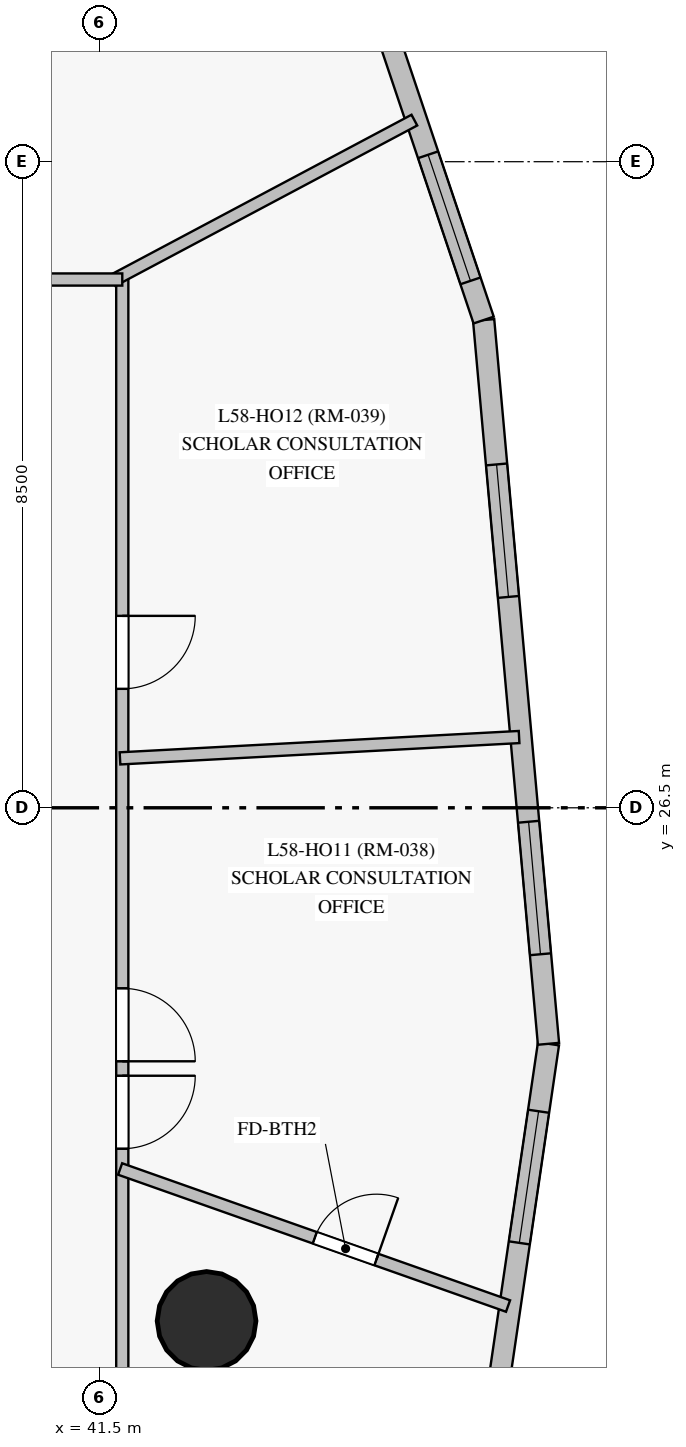
"""IFC4 building model, lengths in metres.
Left out: names, types, materials, properties, quantities, classifications, styles, units other than length and angle.
Written with IfcOpenShell. Run it as: python <this file> out.ifc"""

import sys

from ifc_helpers import new_model, si_unit, direction, frame, frame_2d, origin, origin_with_axes, origin_2d, place, context, subcontext, project, spatial, rectangle, circle, extrude, source, transform, mapped, element, fill, save


model = new_model("IFC4")
c1 = context("Model", 3, precision=1e-05, world=origin(), true_north=direction((0.0, 1.0)))
c2 = subcontext(c1, "Body", "Model", "MODEL_VIEW")
j1 = project(units=[si_unit("LENGTHUNIT", "METRE"), si_unit("PLANEANGLEUNIT", "RADIAN")], contexts=[c1])
p1 = place(None, origin())
s1 = spatial("IfcSite", under=j1, at=p1, CompositionType="ELEMENT")
p2 = place(p1, origin())
s2 = spatial("IfcBuilding", under=s1, at=p2, CompositionType="ELEMENT")
p3 = place(p2, frame((0.0, 0.0, 199.25)))
s3 = spatial("IfcBuildingStorey", under=s2, at=p3, CompositionType="ELEMENT", Elevation=199.25)
m1 = source(origin_with_axes(), c2, "Body", "SweptSolid", [
    extrude(circle(Radius=0.65, at=origin_2d()), origin(), (0.0, 0.0, 1.0), 3.05),
])
p4 = place(p3, frame((42.909, 19.749, 0.0), z_axis=(0.0, 0.0, 1.0), x_axis=(1.0, 0.0, 0.0)))
e1 = element("IfcColumn", 1, at=p4, inside=s3, PredefinedType="COLUMN", context=c2, shape_type="MappedRepresentation", body=[
    mapped(m1, transform((0.0, 0.0, 0.0), scale=1.0)),
])
p5 = place(p3, frame((45.401, 9.705, 0.0), z_axis=(0.0, 0.0, 1.0), x_axis=(0.145019531455, 0.989428792535, 0.0)))
e2 = element("IfcWall", 2, at=p5, inside=s3, PredefinedType="SOLIDWALL", context=c2, shape_type="SweptSolid", body=[
    extrude(rectangle(XDim=13.837, YDim=0.28, at=frame_2d((6.918, 0.0))), origin(), (0.0, 0.0, 1.0), 2.825),
])
p6 = place(p5, frame((2.22, 0.0, 0.85)))
e3 = element("IfcOpeningElement", 3, at=p6, cuts=e2, PredefinedType="OPENING", context=c2, shape_type="SweptSolid", body=[
    extrude(rectangle(XDim=1.75, YDim=1.65, at=frame_2d((0.875, 0.825))), frame((0.0, 0.15, 0.0), z_axis=(0.0, -1.0, 0.0), x_axis=(1.0, 0.0, 0.0)), (0.0, 0.0, 1.0), 0.3),
])
p7 = place(p5, frame((7.366, 0.0, 0.85)))
e4 = element("IfcOpeningElement", 4, at=p7, cuts=e2, PredefinedType="OPENING", context=c2, shape_type="SweptSolid", body=[
    extrude(rectangle(XDim=1.75, YDim=1.65, at=frame_2d((0.875, 0.825))), frame((0.0, 0.15, 0.0), z_axis=(0.0, -1.0, 0.0), x_axis=(1.0, 0.0, 0.0)), (0.0, 0.0, 1.0), 0.3),
])
p8 = place(p5, frame((11.19, 0.0, 0.85)))
e5 = element("IfcOpeningElement", 5, at=p8, cuts=e2, PredefinedType="OPENING", context=c2, shape_type="SweptSolid", body=[
    extrude(rectangle(XDim=1.75, YDim=1.65, at=frame_2d((0.875, 0.825))), frame((0.0, 0.15, 0.0), z_axis=(0.0, -1.0, 0.0), x_axis=(1.0, 0.0, 0.0)), (0.0, 0.0, 1.0), 0.3),
])
p9 = place(p3, frame((47.407, 23.395, 0.0), z_axis=(0.0, 0.0, 1.0), x_axis=(-0.089232355469, 0.996010836657, 0.0)))
e6 = element("IfcWall", 6, at=p9, inside=s3, PredefinedType="SOLIDWALL", context=c2, shape_type="SweptSolid", body=[
    extrude(rectangle(XDim=9.56, YDim=0.28, at=frame_2d((4.78, 0.0))), origin(), (0.0, 0.0, 1.0), 2.825),
])
p10 = place(p9, frame((1.183, 0.0, 0.85)))
e7 = element("IfcOpeningElement", 7, at=p10, cuts=e6, PredefinedType="OPENING", context=c2, shape_type="SweptSolid", body=[
    extrude(rectangle(XDim=1.75, YDim=1.65, at=frame_2d((0.875, 0.825))), frame((0.0, 0.15, 0.0), z_axis=(0.0, -1.0, 0.0), x_axis=(1.0, 0.0, 0.0)), (0.0, 0.0, 1.0), 0.3),
])
p11 = place(p9, frame((5.903, 0.0, 0.85)))
e8 = element("IfcOpeningElement", 8, at=p11, cuts=e6, PredefinedType="OPENING", context=c2, shape_type="SweptSolid", body=[
    extrude(rectangle(XDim=1.75, YDim=1.65, at=frame_2d((0.875, 0.825))), frame((0.0, 0.15, 0.0), z_axis=(0.0, -1.0, 0.0), x_axis=(1.0, 0.0, 0.0)), (0.0, 0.0, 1.0), 0.3),
])
p12 = place(p3, frame((46.554, 32.917, 0.0), z_axis=(0.0, 0.0, 1.0), x_axis=(-0.318603463381, 0.947888091033, 0.0)))
e9 = element("IfcWall", 9, at=p12, inside=s3, PredefinedType="SOLIDWALL", context=c2, shape_type="SweptSolid", body=[
    extrude(rectangle(XDim=13.837, YDim=0.28, at=frame_2d((6.918, 0.0))), origin(), (0.0, 0.0, 1.0), 2.825),
])
p13 = place(p12, frame((0.544, 0.0, 0.85)))
e10 = element("IfcOpeningElement", 10, at=p13, cuts=e9, PredefinedType="OPENING", context=c2, shape_type="SweptSolid", body=[
    extrude(rectangle(XDim=1.75, YDim=1.65, at=frame_2d((0.875, 0.825))), frame((0.0, 0.15, 0.0), z_axis=(0.0, -1.0, 0.0), x_axis=(1.0, 0.0, 0.0)), (0.0, 0.0, 1.0), 0.3),
])
p14 = place(p12, frame((3.949, 0.0, 0.85)))
e11 = element("IfcOpeningElement", 11, at=p14, cuts=e9, PredefinedType="OPENING", context=c2, shape_type="SweptSolid", body=[
    extrude(rectangle(XDim=1.75, YDim=1.65, at=frame_2d((0.875, 0.825))), frame((0.0, 0.15, 0.0), z_axis=(0.0, -1.0, 0.0), x_axis=(1.0, 0.0, 0.0)), (0.0, 0.0, 1.0), 0.3),
])
p15 = place(p12, frame((7.402, 0.0, 0.85)))
e12 = element("IfcOpeningElement", 12, at=p15, cuts=e9, PredefinedType="OPENING", context=c2, shape_type="SweptSolid", body=[
    extrude(rectangle(XDim=1.75, YDim=1.65, at=frame_2d((0.875, 0.825))), frame((0.0, 0.15, 0.0), z_axis=(0.0, -1.0, 0.0), x_axis=(1.0, 0.0, 0.0)), (0.0, 0.0, 1.0), 0.3),
])
p16 = place(p12, frame((10.855, 0.0, 0.85)))
e13 = element("IfcOpeningElement", 13, at=p16, cuts=e9, PredefinedType="OPENING", context=c2, shape_type="SweptSolid", body=[
    extrude(rectangle(XDim=1.75, YDim=1.65, at=frame_2d((0.875, 0.825))), frame((0.0, 0.15, 0.0), z_axis=(0.0, -1.0, 0.0), x_axis=(1.0, 0.0, 0.0)), (0.0, 0.0, 1.0), 0.3),
])
p17 = place(p3, frame((41.8, 33.45, 0.0), z_axis=(0.0, 0.0, 1.0), x_axis=(0.0, -1.0, 0.0)))
e14 = element("IfcWall", 14, at=p17, inside=s3, PredefinedType="PARTITIONING", context=c2, shape_type="SweptSolid", body=[
    extrude(rectangle(XDim=19.6, YDim=0.16, at=frame_2d((9.8, 0.0))), origin(), (0.0, 0.0, 1.0), 2.275),
])
p18 = place(p17, frame((10.475, 0.0, 0.0)))
e15 = element("IfcOpeningElement", 15, at=p18, cuts=e14, PredefinedType="OPENING", context=c2, shape_type="SweptSolid", body=[
    extrude(rectangle(XDim=0.96, YDim=2.15, at=frame_2d((0.48, 1.075))), frame((0.0, 0.09, 0.0), z_axis=(0.0, -1.0, 0.0), x_axis=(1.0, 0.0, 0.0)), (0.0, 0.0, 1.0), 0.18),
])
p19 = place(p17, frame((9.325, 0.0, 0.0)))
e16 = element("IfcOpeningElement", 16, at=p19, cuts=e14, PredefinedType="OPENING", context=c2, shape_type="SweptSolid", body=[
    extrude(rectangle(XDim=0.96, YDim=2.15, at=frame_2d((0.48, 1.075))), frame((0.0, 0.09, 0.0), z_axis=(0.0, -1.0, 0.0), x_axis=(1.0, 0.0, 0.0)), (0.0, 0.0, 1.0), 0.18),
])
p20 = place(p17, frame((4.425, 0.0, 0.0)))
e17 = element("IfcOpeningElement", 17, at=p20, cuts=e14, PredefinedType="OPENING", context=c2, shape_type="SweptSolid", body=[
    extrude(rectangle(XDim=0.96, YDim=2.15, at=frame_2d((0.48, 1.075))), frame((0.0, 0.09, 0.0), z_axis=(0.0, -1.0, 0.0), x_axis=(1.0, 0.0, 0.0)), (0.0, 0.0, 1.0), 0.18),
])
p21 = place(p3, frame((41.772, 21.748, 0.0), z_axis=(0.0, 0.0, 1.0), x_axis=(0.942903697414, -0.333065485156, 0.0)))
e18 = element("IfcWall", 18, at=p21, inside=s3, PredefinedType="PARTITIONING", context=c2, shape_type="SweptSolid", body=[
    extrude(rectangle(XDim=5.413, YDim=0.16, at=frame_2d((2.706, 0.0))), origin(), (0.0, 0.0, 1.0), 2.825),
])
p22 = place(p21, frame((2.716, 0.0, 0.0)))
e19 = element("IfcOpeningElement", 19, at=p22, cuts=e18, PredefinedType="OPENING", context=c2, shape_type="SweptSolid", body=[
    extrude(rectangle(XDim=0.86, YDim=2.04, at=frame_2d((0.43, 1.02))), frame((0.0, 0.09, 0.0), z_axis=(0.0, -1.0, 0.0), x_axis=(1.0, 0.0, 0.0)), (0.0, 0.0, 1.0), 0.18),
])
p23 = place(p3, frame((41.77, 27.15, 0.0), z_axis=(0.0, 0.0, 1.0), x_axis=(0.998570877024, 0.053443461334, 0.0)))
e20 = element("IfcWall", 20, at=p23, inside=s3, PredefinedType="PARTITIONING", context=c2, shape_type="SweptSolid", body=[
    extrude(rectangle(XDim=5.258, YDim=0.16, at=frame_2d((2.629, 0.0))), origin(), (0.0, 0.0, 1.0), 2.825),
])
p24 = place(p3, frame((41.672, 33.436, 0.0), z_axis=(0.0, 0.0, 1.0), x_axis=(0.882929374505, 0.469505824923, 0.0)))
e21 = element("IfcWall", 21, at=p24, inside=s3, PredefinedType="PARTITIONING", context=c2, shape_type="SweptSolid", body=[
    extrude(rectangle(XDim=4.497, YDim=0.16, at=frame_2d((2.249, 0.0))), origin(), (0.0, 0.0, 1.0), 2.825),
])
p25 = place(p3, frame((37.707, 33.45, 0.0), z_axis=(0.0, 0.0, 1.0), x_axis=(1.0, 0.0, 0.0)))
e22 = element("IfcWall", 22, at=p25, inside=s3, PredefinedType="PARTITIONING", context=c2, shape_type="SweptSolid", body=[
    extrude(rectangle(XDim=4.093, YDim=0.16, at=frame_2d((2.046, 0.0))), origin(), (0.0, 0.0, 1.0), 2.825),
])
m2 = source(origin_with_axes(), c2, "Body", "SweptSolid", [
    extrude(rectangle(XDim=1.75, YDim=1.65, at=frame_2d((0.875, 0.825))), frame((0.0, 0.03, 0.0), z_axis=(0.0, -1.0, 0.0), x_axis=(1.0, 0.0, 0.0)), (0.0, 0.0, 1.0), 0.06),
])
p26 = place(p8, origin())
e23 = element("IfcWindow", 23, at=p26, inside=s3, PartitioningType="SINGLE_PANEL", PredefinedType="WINDOW", context=c2, shape_type="MappedRepresentation", body=[
    mapped(m2, transform((0.0, 0.0, 0.0), scale=1.0)),
])
fill(e5, e23)
p27 = place(p10, origin())
e24 = element("IfcWindow", 24, at=p27, inside=s3, PartitioningType="SINGLE_PANEL", PredefinedType="WINDOW", context=c2, shape_type="MappedRepresentation", body=[
    mapped(m2, transform((0.0, 0.0, 0.0), scale=1.0)),
])
fill(e7, e24)
p28 = place(p11, origin())
e25 = element("IfcWindow", 25, at=p28, inside=s3, PartitioningType="SINGLE_PANEL", PredefinedType="WINDOW", context=c2, shape_type="MappedRepresentation", body=[
    mapped(m2, transform((0.0, 0.0, 0.0), scale=1.0)),
])
fill(e8, e25)
p29 = place(p13, origin())
e26 = element("IfcWindow", 26, at=p29, inside=s3, PartitioningType="SINGLE_PANEL", PredefinedType="WINDOW", context=c2, shape_type="MappedRepresentation", body=[
    mapped(m2, transform((0.0, 0.0, 0.0), scale=1.0)),
])
fill(e10, e26)
m3 = source(origin_with_axes(), c2, "Body", "SweptSolid", [
    extrude(rectangle(XDim=0.96, YDim=2.15, at=frame_2d((0.48, 1.075))), frame((0.0, 0.025, 0.0), z_axis=(0.0, -1.0, 0.0), x_axis=(1.0, 0.0, 0.0)), (0.0, 0.0, 1.0), 0.05),
])
p30 = place(p18, origin())
e27 = element("IfcDoor", 27, at=p30, inside=s3, OperationType="SINGLE_SWING_LEFT", PredefinedType="DOOR", context=c2, shape_type="MappedRepresentation", body=[
    mapped(m3, transform((0.0, 0.0, 0.0), scale=1.0)),
])
fill(e15, e27)
p31 = place(p19, origin())
e28 = element("IfcDoor", 28, at=p31, inside=s3, OperationType="SINGLE_SWING_RIGHT", PredefinedType="DOOR", context=c2, shape_type="MappedRepresentation", body=[
    mapped(m3, transform((0.0, 0.0, 0.0), scale=1.0)),
])
fill(e16, e28)
p32 = place(p20, origin())
e29 = element("IfcDoor", 29, at=p32, inside=s3, OperationType="SINGLE_SWING_LEFT", PredefinedType="DOOR", context=c2, shape_type="MappedRepresentation", body=[
    mapped(m3, transform((0.0, 0.0, 0.0), scale=1.0)),
])
fill(e17, e29)
m4 = source(origin_with_axes(), c2, "Body", "SweptSolid", [
    extrude(rectangle(XDim=0.86, YDim=2.04, at=frame_2d((0.43, 1.02))), frame((0.0, 0.025, 0.0), z_axis=(0.0, -1.0, 0.0), x_axis=(1.0, 0.0, 0.0)), (0.0, 0.0, 1.0), 0.05),
])
p33 = place(p22, origin())
e30 = element("IfcDoor", 30, at=p33, inside=s3, OperationType="SINGLE_SWING_RIGHT", PredefinedType="DOOR", context=c2, shape_type="MappedRepresentation", body=[
    mapped(m4, transform((0.0, 0.0, 0.0), scale=1.0)),
])
fill(e19, e30)
save(model, sys.argv[1])
